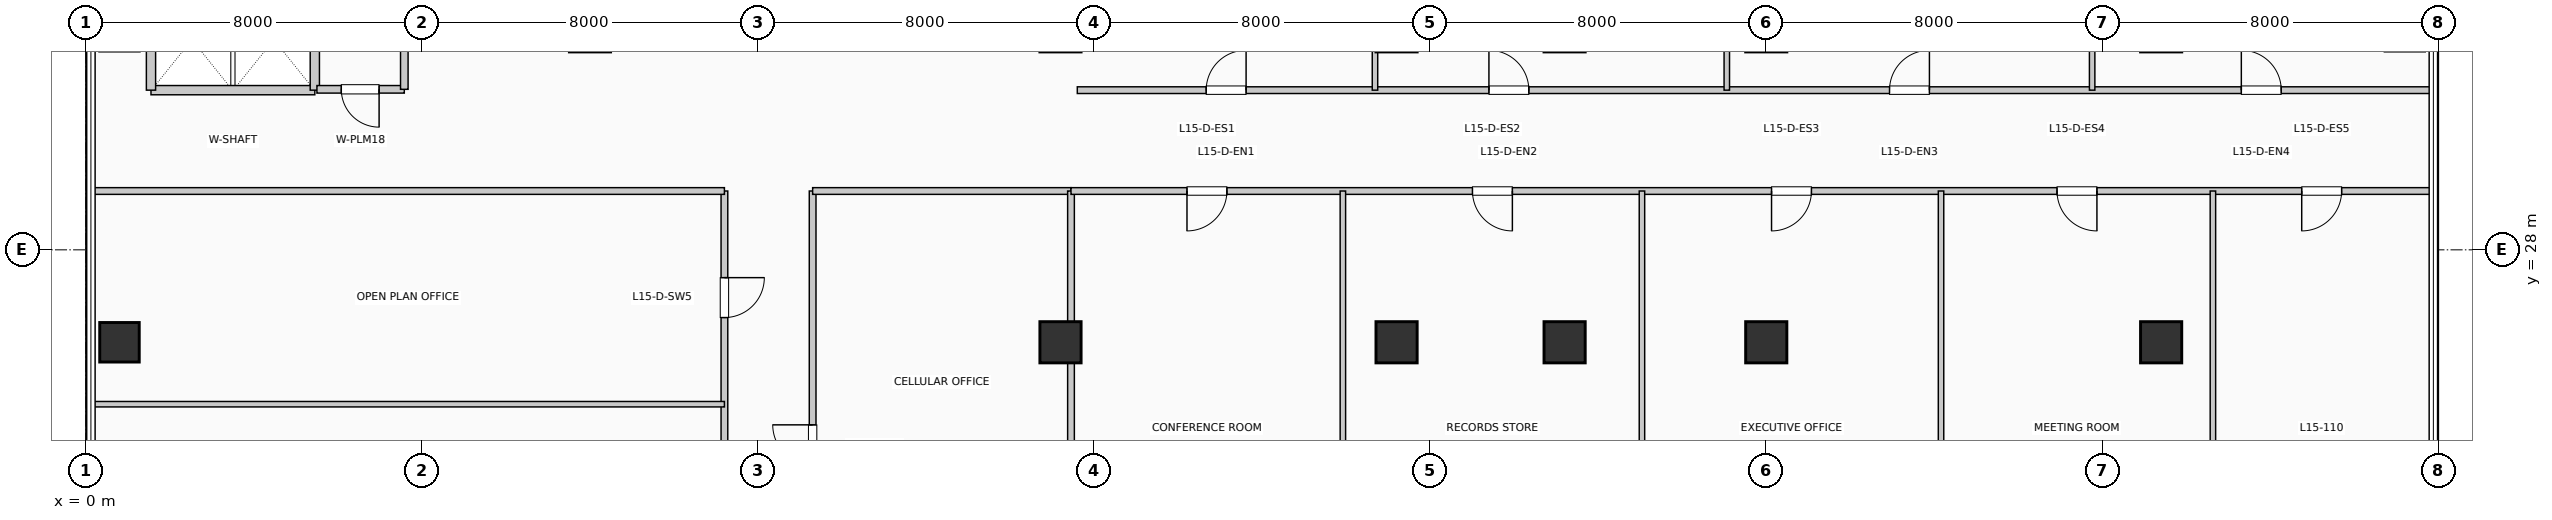
"""IFC4 building model, lengths in metres.
Left out: names, types, materials, properties, quantities, classifications, styles, units other than length and angle.
Written with IfcOpenShell. Run it as: python <this file> out.ifc"""

import sys

from ifc_helpers import new_model, si_unit, direction, frame, frame_2d, origin, origin_2d, place, context, subcontext, project, spatial, rectangle, extrude, element, fill, save


model = new_model("IFC4")
c1 = context("Model", 3, precision=1e-05, world=origin(), true_north=direction((0.0, 1.0)))
c2 = subcontext(c1, "Body", "Model", "MODEL_VIEW")
j1 = project(units=[si_unit("LENGTHUNIT", "METRE"), si_unit("PLANEANGLEUNIT", "RADIAN")], contexts=[c1])
p1 = place(None, origin())
s1 = spatial("IfcSite", under=j1, at=p1, CompositionType="ELEMENT")
p2 = place(p1, origin())
s2 = spatial("IfcBuilding", under=s1, at=p2, CompositionType="ELEMENT")
p3 = place(p2, frame((0.0, 0.0, 66.0)))
s3 = spatial("IfcBuildingStorey", under=s2, at=p3, CompositionType="ELEMENT", Elevation=66.0)
p4 = place(p3, frame((0.8, 25.8, 0.0), z_axis=(0.0, 0.0, 1.0), x_axis=(1.0, 0.0, 0.0)))
e1 = element("IfcColumn", 1, at=p4, inside=s3, PredefinedType="COLUMN", context=c2, shape_type="SweptSolid", body=[
    extrude(rectangle(XDim=0.94, YDim=0.94, at=origin_2d()), origin(), (0.0, 0.0, 1.0), 3.96),
])
for number, where, z_axis, x_axis in (
    (2, (23.2, 25.8, 0.0), (0.0, 0.0, 1.0), (1.0, 0.0, 0.0)),
    (3, (31.2, 25.8, 0.0), (0.0, 0.0, 1.0), (1.0, 0.0, 0.0)),
    (4, (35.2, 25.8, 0.0), (0.0, 0.0, 1.0), (1.0, 0.0, 0.0)),
    (5, (40.0, 25.8, 0.0), (0.0, 0.0, 1.0), (1.0, 0.0, 0.0)),
    (6, (49.4, 25.8, 0.0), (0.0, 0.0, 1.0), (1.0, 0.0, 0.0)),
):
    element("IfcColumn", number, at=place(p3, frame(where, z_axis=z_axis, x_axis=x_axis)), inside=s3, PredefinedType="COLUMN", context=c2, shape_type="SweptSolid", body=[
        extrude(rectangle(XDim=0.98, YDim=0.98, at=origin_2d()), origin(), (0.0, 0.0, 1.0), 3.96),
    ])
p5 = place(p3, frame((1.55, 31.8, 0.0), z_axis=(0.0, 0.0, 1.0), x_axis=(1.0, 0.0, 0.0)))
e7 = element("IfcWall", 7, at=p5, inside=s3, PredefinedType="PARTITIONING", context=c2, shape_type="SweptSolid", body=[
    extrude(rectangle(XDim=3.9, YDim=0.22, at=frame_2d((1.95, 0.0))), origin(), (0.0, 0.0, 1.0), 3.71),
])
for number, where, z_axis, x_axis in (
    (8, (1.55, 31.8, 0.0), (0.0, 0.0, 1.0), (0.0, 1.0, 0.0)),
    (9, (5.45, 31.8, 0.0), (0.0, 0.0, 1.0), (0.0, 1.0, 0.0)),
):
    element("IfcWall", number, at=place(p3, frame(where, z_axis=z_axis, x_axis=x_axis)), inside=s3, PredefinedType="PARTITIONING", context=c2, shape_type="SweptSolid", body=[
        extrude(rectangle(XDim=2.38, YDim=0.22, at=frame_2d((1.19, 0.0))), origin(), (0.0, 0.0, 1.0), 3.71),
    ])
p6 = place(p3, frame((5.5, 31.82, 0.0), z_axis=(0.0, 0.0, 1.0), x_axis=(1.0, 0.0, 0.0)))
e10 = element("IfcWall", 10, at=p6, inside=s3, PredefinedType="PLUMBINGWALL", context=c2, shape_type="SweptSolid", body=[
    extrude(rectangle(XDim=2.08, YDim=0.18, at=frame_2d((1.04, 0.0))), origin(), (0.0, 0.0, 1.0), 3.71),
])
p7 = place(p6, frame((1.48, 0.0, 0.0), z_axis=(0.0, 0.0, 1.0), x_axis=(-1.0, 0.0, 0.0)))
e11 = element("IfcOpeningElement", 11, at=p7, cuts=e10, PredefinedType="OPENING", context=c2, shape_type="SweptSolid", body=[
    extrude(rectangle(XDim=0.9, YDim=2.1, at=frame_2d((0.45, 1.05))), frame((0.0, 0.1, 0.0), z_axis=(0.0, -1.0, 0.0), x_axis=(1.0, 0.0, 0.0)), (0.0, 0.0, 1.0), 0.2),
])
p8 = place(p3, frame((7.58, 31.82, 0.0), z_axis=(0.0, 0.0, 1.0), x_axis=(0.0, 1.0, 0.0)))
e12 = element("IfcWall", 12, at=p8, inside=s3, PredefinedType="PLUMBINGWALL", context=c2, shape_type="SweptSolid", body=[
    extrude(rectangle(XDim=2.36, YDim=0.18, at=frame_2d((1.18, 0.0))), origin(), (0.0, 0.0, 1.0), 3.71),
])
p9 = place(p3, frame((15.2, 5.24, 0.0), z_axis=(0.0, 0.0, 1.0), x_axis=(0.0, 1.0, 0.0)))
e13 = element("IfcWall", 13, at=p9, inside=s3, PredefinedType="PARTITIONING", context=c2, shape_type="SweptSolid", body=[
    extrude(rectangle(XDim=24.16, YDim=0.16, at=frame_2d((12.08, 0.0))), origin(), (0.0, 0.0, 1.0), 3.71),
])
p10 = place(p9, frame((2.77, 0.0, 0.0), z_axis=(0.0, 0.0, 1.0), x_axis=(-1.0, 0.0, 0.0)))
e14 = element("IfcOpeningElement", 14, at=p10, cuts=e13, PredefinedType="OPENING", context=c2, shape_type="SweptSolid", body=[
    extrude(rectangle(XDim=0.95, YDim=2.15, at=frame_2d((0.475, 1.075))), frame((0.0, 0.09, 0.0), z_axis=(0.0, -1.0, 0.0), x_axis=(1.0, 0.0, 0.0)), (0.0, 0.0, 1.0), 0.18),
])
p11 = place(p9, frame((7.481, 0.0, 0.0), z_axis=(0.0, 0.0, 1.0), x_axis=(-1.0, 0.0, 0.0)))
e15 = element("IfcOpeningElement", 15, at=p11, cuts=e13, PredefinedType="OPENING", context=c2, shape_type="SweptSolid", body=[
    extrude(rectangle(XDim=0.95, YDim=2.15, at=frame_2d((0.475, 1.075))), frame((0.0, 0.09, 0.0), z_axis=(0.0, -1.0, 0.0), x_axis=(1.0, 0.0, 0.0)), (0.0, 0.0, 1.0), 0.18),
])
p12 = place(p9, frame((12.313, 0.0, 0.0), z_axis=(0.0, 0.0, 1.0), x_axis=(-1.0, 0.0, 0.0)))
e16 = element("IfcOpeningElement", 16, at=p12, cuts=e13, PredefinedType="OPENING", context=c2, shape_type="SweptSolid", body=[
    extrude(rectangle(XDim=0.95, YDim=2.15, at=frame_2d((0.475, 1.075))), frame((0.0, 0.09, 0.0), z_axis=(0.0, -1.0, 0.0), x_axis=(1.0, 0.0, 0.0)), (0.0, 0.0, 1.0), 0.18),
])
p13 = place(p9, frame((17.145, 0.0, 0.0), z_axis=(0.0, 0.0, 1.0), x_axis=(-1.0, 0.0, 0.0)))
e17 = element("IfcOpeningElement", 17, at=p13, cuts=e13, PredefinedType="OPENING", context=c2, shape_type="SweptSolid", body=[
    extrude(rectangle(XDim=0.95, YDim=2.15, at=frame_2d((0.475, 1.075))), frame((0.0, 0.09, 0.0), z_axis=(0.0, -1.0, 0.0), x_axis=(1.0, 0.0, 0.0)), (0.0, 0.0, 1.0), 0.18),
])
p14 = place(p9, frame((22.098, 0.0, 0.0), z_axis=(0.0, 0.0, 1.0), x_axis=(-1.0, 0.0, 0.0)))
e18 = element("IfcOpeningElement", 18, at=p14, cuts=e13, PredefinedType="OPENING", context=c2, shape_type="SweptSolid", body=[
    extrude(rectangle(XDim=0.95, YDim=2.15, at=frame_2d((0.475, 1.075))), frame((0.0, 0.09, 0.0), z_axis=(0.0, -1.0, 0.0), x_axis=(1.0, 0.0, 0.0)), (0.0, 0.0, 1.0), 0.18),
])
p15 = place(p3, frame((17.3, 5.24, 0.0), z_axis=(0.0, 0.0, 1.0), x_axis=(0.0, 1.0, 0.0)))
e19 = element("IfcWall", 19, at=p15, inside=s3, PredefinedType="PARTITIONING", context=c2, shape_type="SweptSolid", body=[
    extrude(rectangle(XDim=24.16, YDim=0.16, at=frame_2d((12.08, 0.0))), origin(), (0.0, 0.0, 1.0), 3.71),
])
p16 = place(p15, frame((5.565, 0.0, 0.0)))
e20 = element("IfcOpeningElement", 20, at=p16, cuts=e19, PredefinedType="OPENING", context=c2, shape_type="SweptSolid", body=[
    extrude(rectangle(XDim=0.95, YDim=2.15, at=frame_2d((0.475, 1.075))), frame((0.0, 0.09, 0.0), z_axis=(0.0, -1.0, 0.0), x_axis=(1.0, 0.0, 0.0)), (0.0, 0.0, 1.0), 0.18),
])
p17 = place(p15, frame((17.645, 0.0, 0.0)))
e21 = element("IfcOpeningElement", 21, at=p17, cuts=e19, PredefinedType="OPENING", context=c2, shape_type="SweptSolid", body=[
    extrude(rectangle(XDim=0.95, YDim=2.15, at=frame_2d((0.475, 1.075))), frame((0.0, 0.09, 0.0), z_axis=(0.0, -1.0, 0.0), x_axis=(1.0, 0.0, 0.0)), (0.0, 0.0, 1.0), 0.18),
])
p18 = place(p3, frame((0.19, 29.4, 0.0), z_axis=(0.0, 0.0, 1.0), x_axis=(1.0, 0.0, 0.0)))
e22 = element("IfcWall", 22, at=p18, inside=s3, PredefinedType="PARTITIONING", context=c2, shape_type="SweptSolid", body=[
    extrude(rectangle(XDim=15.01, YDim=0.16, at=frame_2d((7.505, 0.0))), origin(), (0.0, 0.0, 1.0), 3.365),
])
p19 = place(p3, frame((17.3, 29.4, 0.0), z_axis=(0.0, 0.0, 1.0), x_axis=(1.0, 0.0, 0.0)))
e23 = element("IfcWall", 23, at=p19, inside=s3, PredefinedType="PARTITIONING", context=c2, shape_type="SweptSolid", body=[
    extrude(rectangle(XDim=6.15, YDim=0.16, at=frame_2d((3.075, 0.0))), origin(), (0.0, 0.0, 1.0), 3.71),
])
p20 = place(p3, frame((23.45, 1.04, 0.0), z_axis=(0.0, 0.0, 1.0), x_axis=(0.0, 1.0, 0.0)))
e24 = element("IfcWall", 24, at=p20, inside=s3, PredefinedType="PARTITIONING", context=c2, shape_type="SweptSolid", body=[
    extrude(rectangle(XDim=28.36, YDim=0.16, at=frame_2d((14.18, 0.0))), origin(), (0.0, 0.0, 1.0), 2.995),
])
p21 = place(p3, frame((0.19, 24.326, 0.0), z_axis=(0.0, 0.0, 1.0), x_axis=(1.0, 0.0, 0.0)))
e25 = element("IfcWall", 25, at=p21, inside=s3, PredefinedType="PARTITIONING", context=c2, shape_type="SweptSolid", body=[
    extrude(rectangle(XDim=15.01, YDim=0.13, at=frame_2d((7.505, 0.0))), origin(), (0.0, 0.0, 1.0), 3.71),
])
p22 = place(p3, frame((23.45, 29.4, 0.0), z_axis=(0.0, 0.0, 1.0), x_axis=(1.0, 0.0, 0.0)))
e26 = element("IfcWall", 26, at=p22, inside=s3, PredefinedType="PARTITIONING", context=c2, shape_type="SweptSolid", body=[
    extrude(rectangle(XDim=32.36, YDim=0.16, at=frame_2d((16.18, 0.0))), origin(), (0.0, 0.0, 1.0), 3.365),
])
p23 = place(p22, frame((3.711, 0.0, 0.0), z_axis=(0.0, 0.0, 1.0), x_axis=(-1.0, 0.0, 0.0)))
e27 = element("IfcOpeningElement", 27, at=p23, cuts=e26, PredefinedType="OPENING", context=c2, shape_type="SweptSolid", body=[
    extrude(rectangle(XDim=0.95, YDim=2.15, at=frame_2d((0.475, 1.075))), frame((0.0, 0.09, 0.0), z_axis=(0.0, -1.0, 0.0), x_axis=(1.0, 0.0, 0.0)), (0.0, 0.0, 1.0), 0.18),
])
p24 = place(p22, frame((10.507, 0.0, 0.0), z_axis=(0.0, 0.0, 1.0), x_axis=(-1.0, 0.0, 0.0)))
e28 = element("IfcOpeningElement", 28, at=p24, cuts=e26, PredefinedType="OPENING", context=c2, shape_type="SweptSolid", body=[
    extrude(rectangle(XDim=0.95, YDim=2.15, at=frame_2d((0.475, 1.075))), frame((0.0, 0.09, 0.0), z_axis=(0.0, -1.0, 0.0), x_axis=(1.0, 0.0, 0.0)), (0.0, 0.0, 1.0), 0.18),
])
p25 = place(p22, frame((17.626, 0.0, 0.0), z_axis=(0.0, 0.0, 1.0), x_axis=(-1.0, 0.0, 0.0)))
e29 = element("IfcOpeningElement", 29, at=p25, cuts=e26, PredefinedType="OPENING", context=c2, shape_type="SweptSolid", body=[
    extrude(rectangle(XDim=0.95, YDim=2.15, at=frame_2d((0.475, 1.075))), frame((0.0, 0.09, 0.0), z_axis=(0.0, -1.0, 0.0), x_axis=(1.0, 0.0, 0.0)), (0.0, 0.0, 1.0), 0.18),
])
p26 = place(p22, frame((24.421, 0.0, 0.0), z_axis=(0.0, 0.0, 1.0), x_axis=(-1.0, 0.0, 0.0)))
e30 = element("IfcOpeningElement", 30, at=p26, cuts=e26, PredefinedType="OPENING", context=c2, shape_type="SweptSolid", body=[
    extrude(rectangle(XDim=0.95, YDim=2.15, at=frame_2d((0.475, 1.075))), frame((0.0, 0.09, 0.0), z_axis=(0.0, -1.0, 0.0), x_axis=(1.0, 0.0, 0.0)), (0.0, 0.0, 1.0), 0.18),
])
p27 = place(p22, frame((30.246, 0.0, 0.0), z_axis=(0.0, 0.0, 1.0), x_axis=(-1.0, 0.0, 0.0)))
e31 = element("IfcOpeningElement", 31, at=p27, cuts=e26, PredefinedType="OPENING", context=c2, shape_type="SweptSolid", body=[
    extrude(rectangle(XDim=0.95, YDim=2.15, at=frame_2d((0.475, 1.075))), frame((0.0, 0.09, 0.0), z_axis=(0.0, -1.0, 0.0), x_axis=(1.0, 0.0, 0.0)), (0.0, 0.0, 1.0), 0.18),
])
p28 = place(p3, frame((23.6, 31.8, 0.0), z_axis=(0.0, 0.0, 1.0), x_axis=(1.0, 0.0, 0.0)))
e32 = element("IfcWall", 32, at=p28, inside=s3, PredefinedType="PARTITIONING", context=c2, shape_type="SweptSolid", body=[
    extrude(rectangle(XDim=32.21, YDim=0.16, at=frame_2d((16.105, 0.0))), origin(), (0.0, 0.0, 1.0), 3.71),
])
p29 = place(p28, frame((3.068, 0.0, 0.0)))
e33 = element("IfcOpeningElement", 33, at=p29, cuts=e32, PredefinedType="OPENING", context=c2, shape_type="SweptSolid", body=[
    extrude(rectangle(XDim=0.95, YDim=2.15, at=frame_2d((0.475, 1.075))), frame((0.0, 0.09, 0.0), z_axis=(0.0, -1.0, 0.0), x_axis=(1.0, 0.0, 0.0)), (0.0, 0.0, 1.0), 0.18),
])
p30 = place(p28, frame((9.799, 0.0, 0.0)))
e34 = element("IfcOpeningElement", 34, at=p30, cuts=e32, PredefinedType="OPENING", context=c2, shape_type="SweptSolid", body=[
    extrude(rectangle(XDim=0.95, YDim=2.15, at=frame_2d((0.475, 1.075))), frame((0.0, 0.09, 0.0), z_axis=(0.0, -1.0, 0.0), x_axis=(1.0, 0.0, 0.0)), (0.0, 0.0, 1.0), 0.18),
])
p31 = place(p28, frame((19.334, 0.0, 0.0)))
e35 = element("IfcOpeningElement", 35, at=p31, cuts=e32, PredefinedType="OPENING", context=c2, shape_type="SweptSolid", body=[
    extrude(rectangle(XDim=0.95, YDim=2.15, at=frame_2d((0.475, 1.075))), frame((0.0, 0.09, 0.0), z_axis=(0.0, -1.0, 0.0), x_axis=(1.0, 0.0, 0.0)), (0.0, 0.0, 1.0), 0.18),
])
p32 = place(p28, frame((27.709, 0.0, 0.0)))
e36 = element("IfcOpeningElement", 36, at=p32, cuts=e32, PredefinedType="OPENING", context=c2, shape_type="SweptSolid", body=[
    extrude(rectangle(XDim=0.95, YDim=2.15, at=frame_2d((0.475, 1.075))), frame((0.0, 0.09, 0.0), z_axis=(0.0, -1.0, 0.0), x_axis=(1.0, 0.0, 0.0)), (0.0, 0.0, 1.0), 0.18),
])
for number, where, z_axis, x_axis in (
    (37, (29.922, 18.19, 0.0), (0.0, 0.0, 1.0), (0.0, 1.0, 0.0)),
    (38, (37.041, 18.19, 0.0), (0.0, 0.0, 1.0), (0.0, 1.0, 0.0)),
    (39, (44.16, 18.19, 0.0), (0.0, 0.0, 1.0), (0.0, 1.0, 0.0)),
    (40, (50.632, 18.19, 0.0), (0.0, 0.0, 1.0), (0.0, 1.0, 0.0)),
):
    element("IfcWall", number, at=place(p3, frame(where, z_axis=z_axis, x_axis=x_axis)), inside=s3, PredefinedType="PARTITIONING", context=c2, shape_type="SweptSolid", body=[
        extrude(rectangle(XDim=11.21, YDim=0.13, at=frame_2d((5.605, 0.0))), origin(), (0.0, 0.0, 1.0), 3.71),
    ])
for number, where, z_axis, x_axis in (
    (41, (30.686, 31.8, 0.0), (0.0, 0.0, 1.0), (0.0, 1.0, 0.0)),
    (42, (39.061, 31.8, 0.0), (0.0, 0.0, 1.0), (0.0, 1.0, 0.0)),
    (43, (47.758, 31.8, 0.0), (0.0, 0.0, 1.0), (0.0, 1.0, 0.0)),
):
    element("IfcWall", number, at=place(p3, frame(where, z_axis=z_axis, x_axis=x_axis)), inside=s3, PredefinedType="PARTITIONING", context=c2, shape_type="SweptSolid", body=[
        extrude(rectangle(XDim=14.01, YDim=0.13, at=frame_2d((7.005, 0.0))), origin(), (0.0, 0.0, 1.0), 3.71),
    ])
p33 = place(p7, origin())
e44 = element("IfcDoor", 44, at=p33, inside=s3, OperationType="SINGLE_SWING_RIGHT", PredefinedType="DOOR", context=c2, shape_type="SweptSolid", body=[
    extrude(rectangle(XDim=0.9, YDim=2.1, at=frame_2d((0.45, 1.05))), frame((0.0, 0.025, 0.0), z_axis=(0.0, -1.0, 0.0), x_axis=(1.0, 0.0, 0.0)), (0.0, 0.0, 1.0), 0.05),
])
fill(e11, e44)
p34 = place(p14, origin())
e45 = element("IfcDoor", 45, at=p34, inside=s3, OperationType="SINGLE_SWING_RIGHT", PredefinedType="DOOR", context=c2, shape_type="SweptSolid", body=[
    extrude(rectangle(XDim=0.95, YDim=2.15, at=frame_2d((0.475, 1.075))), frame((0.0, 0.025, 0.0), z_axis=(0.0, -1.0, 0.0), x_axis=(1.0, 0.0, 0.0)), (0.0, 0.0, 1.0), 0.05),
])
fill(e18, e45)
p35 = place(p17, origin())
e46 = element("IfcDoor", 46, at=p35, inside=s3, OperationType="SINGLE_SWING_RIGHT", PredefinedType="DOOR", context=c2, shape_type="SweptSolid", body=[
    extrude(rectangle(XDim=0.95, YDim=2.15, at=frame_2d((0.475, 1.075))), frame((0.0, 0.025, 0.0), z_axis=(0.0, -1.0, 0.0), x_axis=(1.0, 0.0, 0.0)), (0.0, 0.0, 1.0), 0.05),
])
fill(e21, e46)
p36 = place(p23, origin())
e47 = element("IfcDoor", 47, at=p36, inside=s3, OperationType="SINGLE_SWING_LEFT", PredefinedType="DOOR", context=c2, shape_type="SweptSolid", body=[
    extrude(rectangle(XDim=0.95, YDim=2.15, at=frame_2d((0.475, 1.075))), frame((0.0, 0.025, 0.0), z_axis=(0.0, -1.0, 0.0), x_axis=(1.0, 0.0, 0.0)), (0.0, 0.0, 1.0), 0.05),
])
fill(e27, e47)
p37 = place(p24, origin())
e48 = element("IfcDoor", 48, at=p37, inside=s3, OperationType="SINGLE_SWING_RIGHT", PredefinedType="DOOR", context=c2, shape_type="SweptSolid", body=[
    extrude(rectangle(XDim=0.95, YDim=2.15, at=frame_2d((0.475, 1.075))), frame((0.0, 0.025, 0.0), z_axis=(0.0, -1.0, 0.0), x_axis=(1.0, 0.0, 0.0)), (0.0, 0.0, 1.0), 0.05),
])
fill(e28, e48)
p38 = place(p25, origin())
e49 = element("IfcDoor", 49, at=p38, inside=s3, OperationType="SINGLE_SWING_LEFT", PredefinedType="DOOR", context=c2, shape_type="SweptSolid", body=[
    extrude(rectangle(XDim=0.95, YDim=2.15, at=frame_2d((0.475, 1.075))), frame((0.0, 0.025, 0.0), z_axis=(0.0, -1.0, 0.0), x_axis=(1.0, 0.0, 0.0)), (0.0, 0.0, 1.0), 0.05),
])
fill(e29, e49)
p39 = place(p26, origin())
e50 = element("IfcDoor", 50, at=p39, inside=s3, OperationType="SINGLE_SWING_RIGHT", PredefinedType="DOOR", context=c2, shape_type="SweptSolid", body=[
    extrude(rectangle(XDim=0.95, YDim=2.15, at=frame_2d((0.475, 1.075))), frame((0.0, 0.025, 0.0), z_axis=(0.0, -1.0, 0.0), x_axis=(1.0, 0.0, 0.0)), (0.0, 0.0, 1.0), 0.05),
])
fill(e30, e50)
p40 = place(p27, origin())
e51 = element("IfcDoor", 51, at=p40, inside=s3, OperationType="SINGLE_SWING_LEFT", PredefinedType="DOOR", context=c2, shape_type="SweptSolid", body=[
    extrude(rectangle(XDim=0.95, YDim=2.15, at=frame_2d((0.475, 1.075))), frame((0.0, 0.025, 0.0), z_axis=(0.0, -1.0, 0.0), x_axis=(1.0, 0.0, 0.0)), (0.0, 0.0, 1.0), 0.05),
])
fill(e31, e51)
p41 = place(p29, origin())
e52 = element("IfcDoor", 52, at=p41, inside=s3, OperationType="SINGLE_SWING_RIGHT", PredefinedType="DOOR", context=c2, shape_type="SweptSolid", body=[
    extrude(rectangle(XDim=0.95, YDim=2.15, at=frame_2d((0.475, 1.075))), frame((0.0, 0.025, 0.0), z_axis=(0.0, -1.0, 0.0), x_axis=(1.0, 0.0, 0.0)), (0.0, 0.0, 1.0), 0.05),
])
fill(e33, e52)
p42 = place(p30, origin())
e53 = element("IfcDoor", 53, at=p42, inside=s3, OperationType="SINGLE_SWING_LEFT", PredefinedType="DOOR", context=c2, shape_type="SweptSolid", body=[
    extrude(rectangle(XDim=0.95, YDim=2.15, at=frame_2d((0.475, 1.075))), frame((0.0, 0.025, 0.0), z_axis=(0.0, -1.0, 0.0), x_axis=(1.0, 0.0, 0.0)), (0.0, 0.0, 1.0), 0.05),
])
fill(e34, e53)
p43 = place(p31, origin())
e54 = element("IfcDoor", 54, at=p43, inside=s3, OperationType="SINGLE_SWING_RIGHT", PredefinedType="DOOR", context=c2, shape_type="SweptSolid", body=[
    extrude(rectangle(XDim=0.95, YDim=2.15, at=frame_2d((0.475, 1.075))), frame((0.0, 0.025, 0.0), z_axis=(0.0, -1.0, 0.0), x_axis=(1.0, 0.0, 0.0)), (0.0, 0.0, 1.0), 0.05),
])
fill(e35, e54)
p44 = place(p32, origin())
e55 = element("IfcDoor", 55, at=p44, inside=s3, OperationType="SINGLE_SWING_LEFT", PredefinedType="DOOR", context=c2, shape_type="SweptSolid", body=[
    extrude(rectangle(XDim=0.95, YDim=2.15, at=frame_2d((0.475, 1.075))), frame((0.0, 0.025, 0.0), z_axis=(0.0, -1.0, 0.0), x_axis=(1.0, 0.0, 0.0)), (0.0, 0.0, 1.0), 0.05),
])
fill(e36, e55)
save(model, sys.argv[1])
